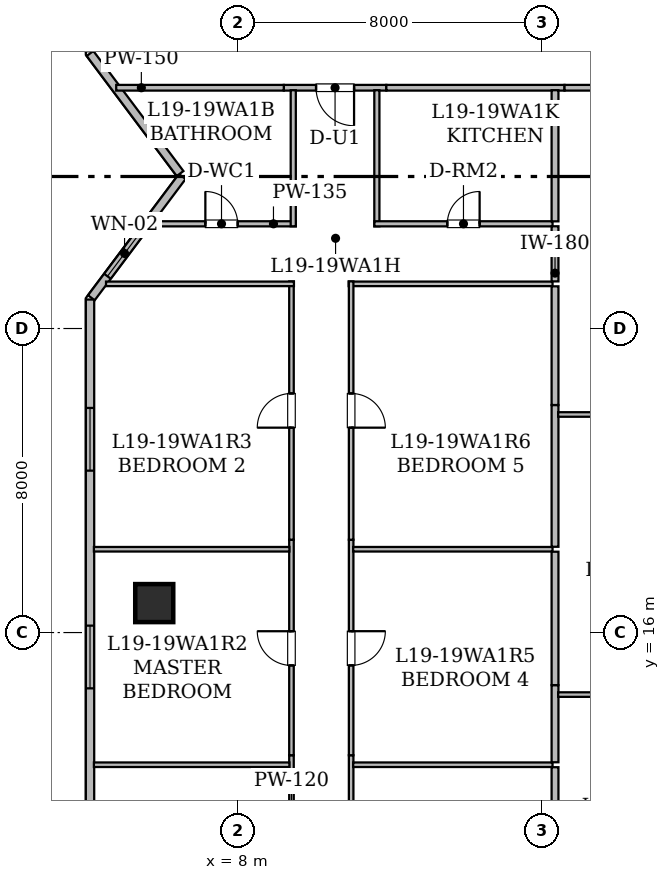
"""IFC4 building model, lengths in metres.
Left out: names, types, materials, properties, quantities, classifications, styles, units other than length and angle.
Written with IfcOpenShell. Run it as: python <this file> out.ifc"""

import sys

from ifc_helpers import new_model, si_unit, direction, frame, frame_2d, origin, origin_2d, place, context, subcontext, project, spatial, rectangle, hollow_rectangle, extrude, element, fill, save


model = new_model("IFC4")
c1 = context("Model", 3, precision=1e-05, world=origin(), true_north=direction((0.0, 1.0)))
c2 = subcontext(c1, "Body", "Model", "MODEL_VIEW")
j1 = project(units=[si_unit("LENGTHUNIT", "METRE"), si_unit("PLANEANGLEUNIT", "RADIAN")], contexts=[c1])
p1 = place(None, origin())
s1 = spatial("IfcSite", under=j1, at=p1, CompositionType="ELEMENT")
p2 = place(p1, origin())
s2 = spatial("IfcBuilding", under=s1, at=p2, CompositionType="ELEMENT")
p3 = place(p2, frame((0.0, 0.0, 77.1)))
s3 = spatial("IfcBuildingStorey", under=s2, at=p3, CompositionType="ELEMENT", Elevation=77.1)
p4 = place(p3, frame((5.8, 16.775, 0.0), z_axis=(0.0, 0.0, 1.0), x_axis=(1.0, 0.0, 0.0)))
e1 = element("IfcColumn", 1, at=p4, inside=s3, PredefinedType="COLUMN", context=c2, shape_type="SweptSolid", body=[
    extrude(hollow_rectangle(XDim=1.0, YDim=1.0, WallThickness=0.05, at=origin_2d()), origin(), (0.0, 0.0, 1.0), 3.65),
])
p5 = place(p3, frame((4.11, 7.317, 0.0), z_axis=(0.0, 0.0, 1.0), x_axis=(0.0, 1.0, 0.0)))
e2 = element("IfcWall", 2, at=p5, inside=s3, PredefinedType="STANDARD", context=c2, shape_type="SweptSolid", body=[
    extrude(rectangle(XDim=17.446, YDim=0.22, at=frame_2d((8.723, 0.0))), origin(), (0.0, 0.0, 1.0), 3.43),
])
p6 = place(p5, frame((2.17, 0.0, 0.85)))
e3 = element("IfcOpeningElement", 3, at=p6, cuts=e2, PredefinedType="OPENING", context=c2, shape_type="SweptSolid", body=[
    extrude(rectangle(XDim=1.65, YDim=1.55, at=frame_2d((0.825, 0.775))), frame((0.0, 0.12, 0.0), z_axis=(0.0, -1.0, 0.0), x_axis=(1.0, 0.0, 0.0)), (0.0, 0.0, 1.0), 0.24),
])
p7 = place(p5, frame((7.215, 0.0, 0.85)))
e4 = element("IfcOpeningElement", 4, at=p7, cuts=e2, PredefinedType="OPENING", context=c2, shape_type="SweptSolid", body=[
    extrude(rectangle(XDim=1.65, YDim=1.55, at=frame_2d((0.825, 0.775))), frame((0.0, 0.12, 0.0), z_axis=(0.0, -1.0, 0.0), x_axis=(1.0, 0.0, 0.0)), (0.0, 0.0, 1.0), 0.24),
])
p8 = place(p5, frame((12.943, 0.0, 0.85)))
e5 = element("IfcOpeningElement", 5, at=p8, cuts=e2, PredefinedType="OPENING", context=c2, shape_type="SweptSolid", body=[
    extrude(rectangle(XDim=1.65, YDim=1.55, at=frame_2d((0.825, 0.775))), frame((0.0, 0.12, 0.0), z_axis=(0.0, -1.0, 0.0), x_axis=(1.0, 0.0, 0.0)), (0.0, 0.0, 1.0), 0.24),
])
p9 = place(p3, frame((4.145, 24.809, 0.0), z_axis=(0.0, 0.0, 1.0), x_axis=(0.599823674734, 0.800132213592, 0.0)))
e6 = element("IfcWall", 6, at=p9, inside=s3, PredefinedType="STANDARD", context=c2, shape_type="SweptSolid", body=[
    extrude(rectangle(XDim=3.988, YDim=0.22, at=frame_2d((1.994, 0.0))), origin(), (0.0, 0.0, 1.0), 3.43),
])
p10 = place(p9, frame((0.707, 0.0, 0.85)))
e7 = element("IfcOpeningElement", 7, at=p10, cuts=e6, PredefinedType="OPENING", context=c2, shape_type="SweptSolid", body=[
    extrude(rectangle(XDim=1.5, YDim=1.6, at=frame_2d((0.75, 0.8))), frame((0.0, 0.12, 0.0), z_axis=(0.0, -1.0, 0.0), x_axis=(1.0, 0.0, 0.0)), (0.0, 0.0, 1.0), 0.24),
])
p11 = place(p3, frame((6.48, 28.077, 0.0), z_axis=(0.0, 0.0, 1.0), x_axis=(-0.599960442794, 0.800029666377, 0.0)))
e8 = element("IfcWall", 8, at=p11, inside=s3, PredefinedType="STANDARD", context=c2, shape_type="SweptSolid", body=[
    extrude(rectangle(XDim=3.95, YDim=0.22, at=frame_2d((1.975, 0.0))), origin(), (0.0, 0.0, 1.0), 3.43),
])
p12 = place(p3, frame((11.907, 30.335, 0.0), z_axis=(0.0, 0.0, 1.0), x_axis=(-1.0, 0.0, 0.0)))
e9 = element("IfcWall", 9, at=p12, inside=s3, PredefinedType="STANDARD", context=c2, shape_type="SweptSolid", body=[
    extrude(rectangle(XDim=2.698, YDim=0.15, at=frame_2d((1.349, 0.0))), origin(), (0.0, 0.0, 1.0), 3.43),
])
p13 = place(p12, frame((0.849, 0.0, 0.0)))
e10 = element("IfcOpeningElement", 10, at=p13, cuts=e9, PredefinedType="OPENING", context=c2, shape_type="SweptSolid", body=[
    extrude(rectangle(XDim=1.0, YDim=2.15, at=frame_2d((0.5, 1.075))), frame((0.0, 0.085, 0.0), z_axis=(0.0, -1.0, 0.0), x_axis=(1.0, 0.0, 0.0)), (0.0, 0.0, 1.0), 0.17),
])
p14 = place(p3, frame((9.209, 30.335, 0.0), z_axis=(0.0, 0.0, 1.0), x_axis=(-1.0, 0.0, 0.0)))
e11 = element("IfcWall", 11, at=p14, inside=s3, PredefinedType="STANDARD", context=c2, shape_type="SweptSolid", body=[
    extrude(rectangle(XDim=4.41, YDim=0.15, at=frame_2d((2.205, 0.0))), origin(), (0.0, 0.0, 1.0), 2.803),
])
p15 = place(p3, frame((16.596, 30.335, 0.0), z_axis=(0.0, 0.0, 1.0), x_axis=(-1.0, 0.0, 0.0)))
e12 = element("IfcWall", 12, at=p15, inside=s3, PredefinedType="STANDARD", context=c2, shape_type="SweptSolid", body=[
    extrude(rectangle(XDim=4.689, YDim=0.15, at=frame_2d((2.344, 0.0))), origin(), (0.0, 0.0, 1.0), 3.43),
])
p16 = place(p3, frame((21.821, 30.335, 0.0), z_axis=(0.0, 0.0, 1.0), x_axis=(-1.0, 0.0, 0.0)))
e13 = element("IfcWall", 13, at=p16, inside=s3, PredefinedType="STANDARD", context=c2, shape_type="SweptSolid", body=[
    extrude(rectangle(XDim=5.225, YDim=0.15, at=frame_2d((2.613, 0.0))), origin(), (0.0, 0.0, 1.0), 2.647),
])
p17 = place(p3, frame((5.618, 26.755, 0.0), z_axis=(0.0, 0.0, 1.0), x_axis=(1.0, 0.0, 0.0)))
e14 = element("IfcWall", 14, at=p17, inside=s3, PredefinedType="PARTITIONING", context=c2, shape_type="SweptSolid", body=[
    extrude(rectangle(XDim=3.905, YDim=0.135, at=frame_2d((1.953, 0.0))), origin(), (0.0, 0.0, 1.0), 2.803),
])
p18 = place(p17, frame((1.527, 0.0, 0.0)))
e15 = element("IfcOpeningElement", 15, at=p18, cuts=e14, PredefinedType="OPENING", context=c2, shape_type="SweptSolid", body=[
    extrude(rectangle(XDim=0.85, YDim=2.1, at=frame_2d((0.425, 1.05))), frame((0.0, 0.077, 0.0), z_axis=(0.0, -1.0, 0.0), x_axis=(1.0, 0.0, 0.0)), (0.0, 0.0, 1.0), 0.155),
])
for number, where, z_axis, x_axis in (
    (16, (9.458, 26.69, 0.0), (0.0, 0.0, 1.0), (0.0, 1.0, 0.0)),
    (17, (11.658, 30.27, 0.0), (0.0, 0.0, 1.0), (0.0, -1.0, 0.0)),
):
    element("IfcWall", number, at=place(p3, frame(where, z_axis=z_axis, x_axis=x_axis)), inside=s3, PredefinedType="PARTITIONING", context=c2, shape_type="SweptSolid", body=[
        extrude(rectangle(XDim=3.58, YDim=0.135, at=frame_2d((1.79, 0.0))), origin(), (0.0, 0.0, 1.0), 3.43),
    ])
p19 = place(p3, frame((11.593, 26.755, 0.0), z_axis=(0.0, 0.0, 1.0), x_axis=(1.0, 0.0, 0.0)))
e18 = element("IfcWall", 18, at=p19, inside=s3, PredefinedType="PARTITIONING", context=c2, shape_type="SweptSolid", body=[
    extrude(rectangle(XDim=4.688, YDim=0.135, at=frame_2d((2.344, 0.0))), origin(), (0.0, 0.0, 1.0), 3.43),
])
p20 = place(p19, frame((1.919, 0.0, 0.0)))
e19 = element("IfcOpeningElement", 19, at=p20, cuts=e18, PredefinedType="OPENING", context=c2, shape_type="SweptSolid", body=[
    extrude(rectangle(XDim=0.85, YDim=2.1, at=frame_2d((0.425, 1.05))), frame((0.0, 0.077, 0.0), z_axis=(0.0, -1.0, 0.0), x_axis=(1.0, 0.0, 0.0)), (0.0, 0.0, 1.0), 0.155),
])
p21 = place(p3, frame((9.411, 3.212, 0.0), z_axis=(0.0, 0.0, 1.0), x_axis=(0.0, 1.0, 0.0)))
e20 = element("IfcWall", 20, at=p21, inside=s3, PredefinedType="PARTITIONING", context=c2, shape_type="SweptSolid", body=[
    extrude(rectangle(XDim=9.56, YDim=0.12, at=frame_2d((4.78, 0.0))), origin(), (0.0, 0.0, 1.0), 2.647),
])
p22 = place(p21, frame((4.308, 0.0, 0.0)))
e21 = element("IfcOpeningElement", 21, at=p22, cuts=e20, PredefinedType="OPENING", context=c2, shape_type="SweptSolid", body=[
    extrude(rectangle(XDim=0.9, YDim=2.1, at=frame_2d((0.45, 1.05))), frame((0.0, 0.07, 0.0), z_axis=(0.0, -1.0, 0.0), x_axis=(1.0, 0.0, 0.0)), (0.0, 0.0, 1.0), 0.14),
])
p23 = place(p3, frame((9.411, 12.772, 0.0), z_axis=(0.0, 0.0, 1.0), x_axis=(0.0, 1.0, 0.0)))
e22 = element("IfcWall", 22, at=p23, inside=s3, PredefinedType="PARTITIONING", context=c2, shape_type="SweptSolid", body=[
    extrude(rectangle(XDim=5.67, YDim=0.12, at=frame_2d((2.835, 0.0))), origin(), (0.0, 0.0, 1.0), 2.647),
])
p24 = place(p23, frame((2.363, 0.0, 0.0)))
e23 = element("IfcOpeningElement", 23, at=p24, cuts=e22, PredefinedType="OPENING", context=c2, shape_type="SweptSolid", body=[
    extrude(rectangle(XDim=0.9, YDim=2.1, at=frame_2d((0.45, 1.05))), frame((0.0, 0.07, 0.0), z_axis=(0.0, -1.0, 0.0), x_axis=(1.0, 0.0, 0.0)), (0.0, 0.0, 1.0), 0.14),
])
p25 = place(p3, frame((9.411, 18.442, 0.0), z_axis=(0.0, 0.0, 1.0), x_axis=(0.0, 1.0, 0.0)))
e24 = element("IfcWall", 24, at=p25, inside=s3, PredefinedType="PARTITIONING", context=c2, shape_type="SweptSolid", body=[
    extrude(rectangle(XDim=6.798, YDim=0.12, at=frame_2d((3.399, 0.0))), origin(), (0.0, 0.0, 1.0), 2.961),
])
p26 = place(p25, frame((2.949, 0.0, 0.0)))
e25 = element("IfcOpeningElement", 25, at=p26, cuts=e24, PredefinedType="OPENING", context=c2, shape_type="SweptSolid", body=[
    extrude(rectangle(XDim=0.9, YDim=2.1, at=frame_2d((0.45, 1.05))), frame((0.0, 0.07, 0.0), z_axis=(0.0, -1.0, 0.0), x_axis=(1.0, 0.0, 0.0)), (0.0, 0.0, 1.0), 0.14),
])
p27 = place(p3, frame((9.476, 25.175, 0.0), z_axis=(0.0, 0.0, 1.0), x_axis=(-1.0, 0.0, 0.0)))
e26 = element("IfcWall", 26, at=p27, inside=s3, PredefinedType="PARTITIONING", context=c2, shape_type="SweptSolid", body=[
    extrude(rectangle(XDim=4.945, YDim=0.12, at=frame_2d((2.473, 0.0))), origin(), (0.0, 0.0, 1.0), 2.803),
])
p28 = place(p3, frame((10.981, 12.772, 0.0), z_axis=(0.0, 0.0, 1.0), x_axis=(0.0, -1.0, 0.0)))
e27 = element("IfcWall", 27, at=p28, inside=s3, PredefinedType="PARTITIONING", context=c2, shape_type="SweptSolid", body=[
    extrude(rectangle(XDim=9.56, YDim=0.12, at=frame_2d((4.78, 0.0))), origin(), (0.0, 0.0, 1.0), 2.647),
])
p29 = place(p28, frame((4.351, 0.0, 0.0)))
e28 = element("IfcOpeningElement", 28, at=p29, cuts=e27, PredefinedType="OPENING", context=c2, shape_type="SweptSolid", body=[
    extrude(rectangle(XDim=0.9, YDim=2.1, at=frame_2d((0.45, 1.05))), frame((0.0, 0.07, 0.0), z_axis=(0.0, -1.0, 0.0), x_axis=(1.0, 0.0, 0.0)), (0.0, 0.0, 1.0), 0.14),
])
p30 = place(p3, frame((10.981, 18.442, 0.0), z_axis=(0.0, 0.0, 1.0), x_axis=(0.0, -1.0, 0.0)))
e29 = element("IfcWall", 29, at=p30, inside=s3, PredefinedType="PARTITIONING", context=c2, shape_type="SweptSolid", body=[
    extrude(rectangle(XDim=5.67, YDim=0.12, at=frame_2d((2.835, 0.0))), origin(), (0.0, 0.0, 1.0), 2.647),
])
p31 = place(p30, frame((2.406, 0.0, 0.0)))
e30 = element("IfcOpeningElement", 30, at=p31, cuts=e29, PredefinedType="OPENING", context=c2, shape_type="SweptSolid", body=[
    extrude(rectangle(XDim=0.9, YDim=2.1, at=frame_2d((0.45, 1.05))), frame((0.0, 0.07, 0.0), z_axis=(0.0, -1.0, 0.0), x_axis=(1.0, 0.0, 0.0)), (0.0, 0.0, 1.0), 0.14),
])
p32 = place(p3, frame((16.281, 25.175, 0.0), z_axis=(0.0, 0.0, 1.0), x_axis=(-1.0, 0.0, 0.0)))
e31 = element("IfcWall", 31, at=p32, inside=s3, PredefinedType="PARTITIONING", context=c2, shape_type="SweptSolid", body=[
    extrude(rectangle(XDim=5.365, YDim=0.12, at=frame_2d((2.683, 0.0))), origin(), (0.0, 0.0, 1.0), 3.43),
])
p33 = place(p3, frame((10.981, 25.24, 0.0), z_axis=(0.0, 0.0, 1.0), x_axis=(0.0, -1.0, 0.0)))
e32 = element("IfcWall", 32, at=p33, inside=s3, PredefinedType="PARTITIONING", context=c2, shape_type="SweptSolid", body=[
    extrude(rectangle(XDim=6.798, YDim=0.12, at=frame_2d((3.399, 0.0))), origin(), (0.0, 0.0, 1.0), 2.961),
])
p34 = place(p33, frame((2.949, 0.0, 0.0)))
e33 = element("IfcOpeningElement", 33, at=p34, cuts=e32, PredefinedType="OPENING", context=c2, shape_type="SweptSolid", body=[
    extrude(rectangle(XDim=0.9, YDim=2.1, at=frame_2d((0.45, 1.05))), frame((0.0, 0.07, 0.0), z_axis=(0.0, -1.0, 0.0), x_axis=(1.0, 0.0, 0.0)), (0.0, 0.0, 1.0), 0.14),
])
p35 = place(p3, frame((16.346, 26.69, 0.0), z_axis=(0.0, 0.0, 1.0), x_axis=(0.0, -1.0, 0.0)))
e34 = element("IfcWall", 34, at=p35, inside=s3, PredefinedType="STANDARD", context=c2, shape_type="SweptSolid", body=[
    extrude(rectangle(XDim=1.45, YDim=0.18, at=frame_2d((0.725, 0.0))), origin(), (0.0, 0.0, 1.0), 3.43),
])
p36 = place(p3, frame((16.346, 30.27, 0.0), z_axis=(0.0, 0.0, 1.0), x_axis=(0.0, -1.0, 0.0)))
e35 = element("IfcWall", 35, at=p36, inside=s3, PredefinedType="STANDARD", context=c2, shape_type="SweptSolid", body=[
    extrude(rectangle(XDim=3.45, YDim=0.18, at=frame_2d((1.725, 0.0))), origin(), (0.0, 0.0, 1.0), 3.43),
])
for number, where, z_axis, x_axis in (
    (36, (4.212, 12.522, 0.0), (0.0, 0.0, 1.0), (1.0, 0.0, 0.0)),
    (37, (4.212, 18.192, 0.0), (0.0, 0.0, 1.0), (1.0, 0.0, 0.0)),
):
    element("IfcWall", number, at=place(p3, frame(where, z_axis=z_axis, x_axis=x_axis)), inside=s3, PredefinedType="PARTITIONING", context=c2, shape_type="SweptSolid", body=[
        extrude(rectangle(XDim=5.145, YDim=0.12, at=frame_2d((2.573, 0.0))), origin(), (0.0, 0.0, 1.0), 2.803),
    ])
p37 = place(p3, frame((11.035, 12.522, 0.0), z_axis=(0.0, 0.0, 1.0), x_axis=(1.0, 0.0, 0.0)))
e38 = element("IfcWall", 38, at=p37, inside=s3, PredefinedType="PARTITIONING", context=c2, shape_type="SweptSolid", body=[
    extrude(rectangle(XDim=5.246, YDim=0.12, at=frame_2d((2.623, 0.0))), origin(), (0.0, 0.0, 1.0), 2.647),
])
p38 = place(p3, frame((16.346, 12.457, 0.0), z_axis=(0.0, 0.0, 1.0), x_axis=(0.0, -1.0, 0.0)))
e39 = element("IfcWall", 39, at=p38, inside=s3, PredefinedType="STANDARD", context=c2, shape_type="SweptSolid", body=[
    extrude(rectangle(XDim=4.05, YDim=0.18, at=frame_2d((2.025, 0.0))), origin(), (0.0, 0.0, 1.0), 3.43),
])
p39 = place(p3, frame((11.035, 18.192, 0.0), z_axis=(0.0, 0.0, 1.0), x_axis=(1.0, 0.0, 0.0)))
e40 = element("IfcWall", 40, at=p39, inside=s3, PredefinedType="PARTITIONING", context=c2, shape_type="SweptSolid", body=[
    extrude(rectangle(XDim=5.246, YDim=0.12, at=frame_2d((2.623, 0.0))), origin(), (0.0, 0.0, 1.0), 3.43),
])
p40 = place(p3, frame((16.346, 14.617, 0.0), z_axis=(0.0, 0.0, 1.0), x_axis=(0.0, -1.0, 0.0)))
e41 = element("IfcWall", 41, at=p40, inside=s3, PredefinedType="STANDARD", context=c2, shape_type="SweptSolid", body=[
    extrude(rectangle(XDim=2.03, YDim=0.18, at=frame_2d((1.015, 0.0))), origin(), (0.0, 0.0, 1.0), 2.647),
])
p41 = place(p3, frame((16.346, 18.127, 0.0), z_axis=(0.0, 0.0, 1.0), x_axis=(0.0, -1.0, 0.0)))
e42 = element("IfcWall", 42, at=p41, inside=s3, PredefinedType="STANDARD", context=c2, shape_type="SweptSolid", body=[
    extrude(rectangle(XDim=3.51, YDim=0.18, at=frame_2d((1.755, 0.0))), origin(), (0.0, 0.0, 1.0), 2.647),
])
p42 = place(p3, frame((16.346, 21.987, 0.0), z_axis=(0.0, 0.0, 1.0), x_axis=(0.0, -1.0, 0.0)))
e43 = element("IfcWall", 43, at=p42, inside=s3, PredefinedType="STANDARD", context=c2, shape_type="SweptSolid", body=[
    extrude(rectangle(XDim=3.73, YDim=0.18, at=frame_2d((1.865, 0.0))), origin(), (0.0, 0.0, 1.0), 3.43),
])
p43 = place(p3, frame((16.346, 25.11, 0.0), z_axis=(0.0, 0.0, 1.0), x_axis=(0.0, -1.0, 0.0)))
e44 = element("IfcWall", 44, at=p43, inside=s3, PredefinedType="STANDARD", context=c2, shape_type="SweptSolid", body=[
    extrude(rectangle(XDim=3.123, YDim=0.18, at=frame_2d((1.562, 0.0))), origin(), (0.0, 0.0, 1.0), 2.961),
])
for number, where, z_axis, x_axis in (
    (45, (16.428, 14.368, 0.0), (0.0, 0.0, 1.0), (1.0, 0.0, 0.0)),
    (46, (16.428, 21.738, 0.0), (0.0, 0.0, 1.0), (1.0, 0.0, 0.0)),
):
    element("IfcWall", number, at=place(p3, frame(where, z_axis=z_axis, x_axis=x_axis)), inside=s3, PredefinedType="PARTITIONING", context=c2, shape_type="SweptSolid", body=[
        extrude(rectangle(XDim=5.588, YDim=0.12, at=frame_2d((2.794, 0.0))), origin(), (0.0, 0.0, 1.0), 2.647),
    ])
p44 = place(p10, origin())
e47 = element("IfcWindow", 47, at=p44, inside=s3, PartitioningType="SINGLE_PANEL", PredefinedType="WINDOW", context=c2, shape_type="SweptSolid", body=[
    extrude(rectangle(XDim=1.5, YDim=1.6, at=frame_2d((0.75, 0.8))), frame((0.0, 0.03, 0.0), z_axis=(0.0, -1.0, 0.0), x_axis=(1.0, 0.0, 0.0)), (0.0, 0.0, 1.0), 0.06),
])
fill(e7, e47)
p45 = place(p7, origin())
e48 = element("IfcWindow", 48, at=p45, inside=s3, PartitioningType="SINGLE_PANEL", PredefinedType="WINDOW", context=c2, shape_type="SweptSolid", body=[
    extrude(rectangle(XDim=1.65, YDim=1.55, at=frame_2d((0.825, 0.775))), frame((0.0, 0.03, 0.0), z_axis=(0.0, -1.0, 0.0), x_axis=(1.0, 0.0, 0.0)), (0.0, 0.0, 1.0), 0.06),
])
fill(e4, e48)
p46 = place(p8, origin())
e49 = element("IfcWindow", 49, at=p46, inside=s3, PartitioningType="SINGLE_PANEL", PredefinedType="WINDOW", context=c2, shape_type="SweptSolid", body=[
    extrude(rectangle(XDim=1.65, YDim=1.55, at=frame_2d((0.825, 0.775))), frame((0.0, 0.03, 0.0), z_axis=(0.0, -1.0, 0.0), x_axis=(1.0, 0.0, 0.0)), (0.0, 0.0, 1.0), 0.06),
])
fill(e5, e49)
p47 = place(p13, origin())
e50 = element("IfcDoor", 50, at=p47, inside=s3, OperationType="SINGLE_SWING_LEFT", PredefinedType="DOOR", context=c2, shape_type="SweptSolid", body=[
    extrude(rectangle(XDim=1.0, YDim=2.15, at=frame_2d((0.5, 1.075))), frame((0.0, 0.025, 0.0), z_axis=(0.0, -1.0, 0.0), x_axis=(1.0, 0.0, 0.0)), (0.0, 0.0, 1.0), 0.05),
])
fill(e10, e50)
p48 = place(p18, origin())
e51 = element("IfcDoor", 51, at=p48, inside=s3, OperationType="SINGLE_SWING_LEFT", PredefinedType="DOOR", context=c2, shape_type="SweptSolid", body=[
    extrude(rectangle(XDim=0.85, YDim=2.1, at=frame_2d((0.425, 1.05))), frame((0.0, 0.025, 0.0), z_axis=(0.0, -1.0, 0.0), x_axis=(1.0, 0.0, 0.0)), (0.0, 0.0, 1.0), 0.05),
])
fill(e15, e51)
p49 = place(p20, origin())
e52 = element("IfcDoor", 52, at=p49, inside=s3, OperationType="SINGLE_SWING_RIGHT", PredefinedType="DOOR", context=c2, shape_type="SweptSolid", body=[
    extrude(rectangle(XDim=0.85, YDim=2.1, at=frame_2d((0.425, 1.05))), frame((0.0, 0.025, 0.0), z_axis=(0.0, -1.0, 0.0), x_axis=(1.0, 0.0, 0.0)), (0.0, 0.0, 1.0), 0.05),
])
fill(e19, e52)
p50 = place(p24, origin())
e53 = element("IfcDoor", 53, at=p50, inside=s3, OperationType="SINGLE_SWING_RIGHT", PredefinedType="DOOR", context=c2, shape_type="SweptSolid", body=[
    extrude(rectangle(XDim=0.9, YDim=2.1, at=frame_2d((0.45, 1.05))), frame((0.0, 0.025, 0.0), z_axis=(0.0, -1.0, 0.0), x_axis=(1.0, 0.0, 0.0)), (0.0, 0.0, 1.0), 0.05),
])
fill(e23, e53)
p51 = place(p26, origin())
e54 = element("IfcDoor", 54, at=p51, inside=s3, OperationType="SINGLE_SWING_LEFT", PredefinedType="DOOR", context=c2, shape_type="SweptSolid", body=[
    extrude(rectangle(XDim=0.9, YDim=2.1, at=frame_2d((0.45, 1.05))), frame((0.0, 0.025, 0.0), z_axis=(0.0, -1.0, 0.0), x_axis=(1.0, 0.0, 0.0)), (0.0, 0.0, 1.0), 0.05),
])
fill(e25, e54)
p52 = place(p31, origin())
e55 = element("IfcDoor", 55, at=p52, inside=s3, OperationType="SINGLE_SWING_LEFT", PredefinedType="DOOR", context=c2, shape_type="SweptSolid", body=[
    extrude(rectangle(XDim=0.9, YDim=2.1, at=frame_2d((0.45, 1.05))), frame((0.0, 0.025, 0.0), z_axis=(0.0, -1.0, 0.0), x_axis=(1.0, 0.0, 0.0)), (0.0, 0.0, 1.0), 0.05),
])
fill(e30, e55)
p53 = place(p34, origin())
e56 = element("IfcDoor", 56, at=p53, inside=s3, OperationType="SINGLE_SWING_RIGHT", PredefinedType="DOOR", context=c2, shape_type="SweptSolid", body=[
    extrude(rectangle(XDim=0.9, YDim=2.1, at=frame_2d((0.45, 1.05))), frame((0.0, 0.025, 0.0), z_axis=(0.0, -1.0, 0.0), x_axis=(1.0, 0.0, 0.0)), (0.0, 0.0, 1.0), 0.05),
])
fill(e33, e56)
save(model, sys.argv[1])
